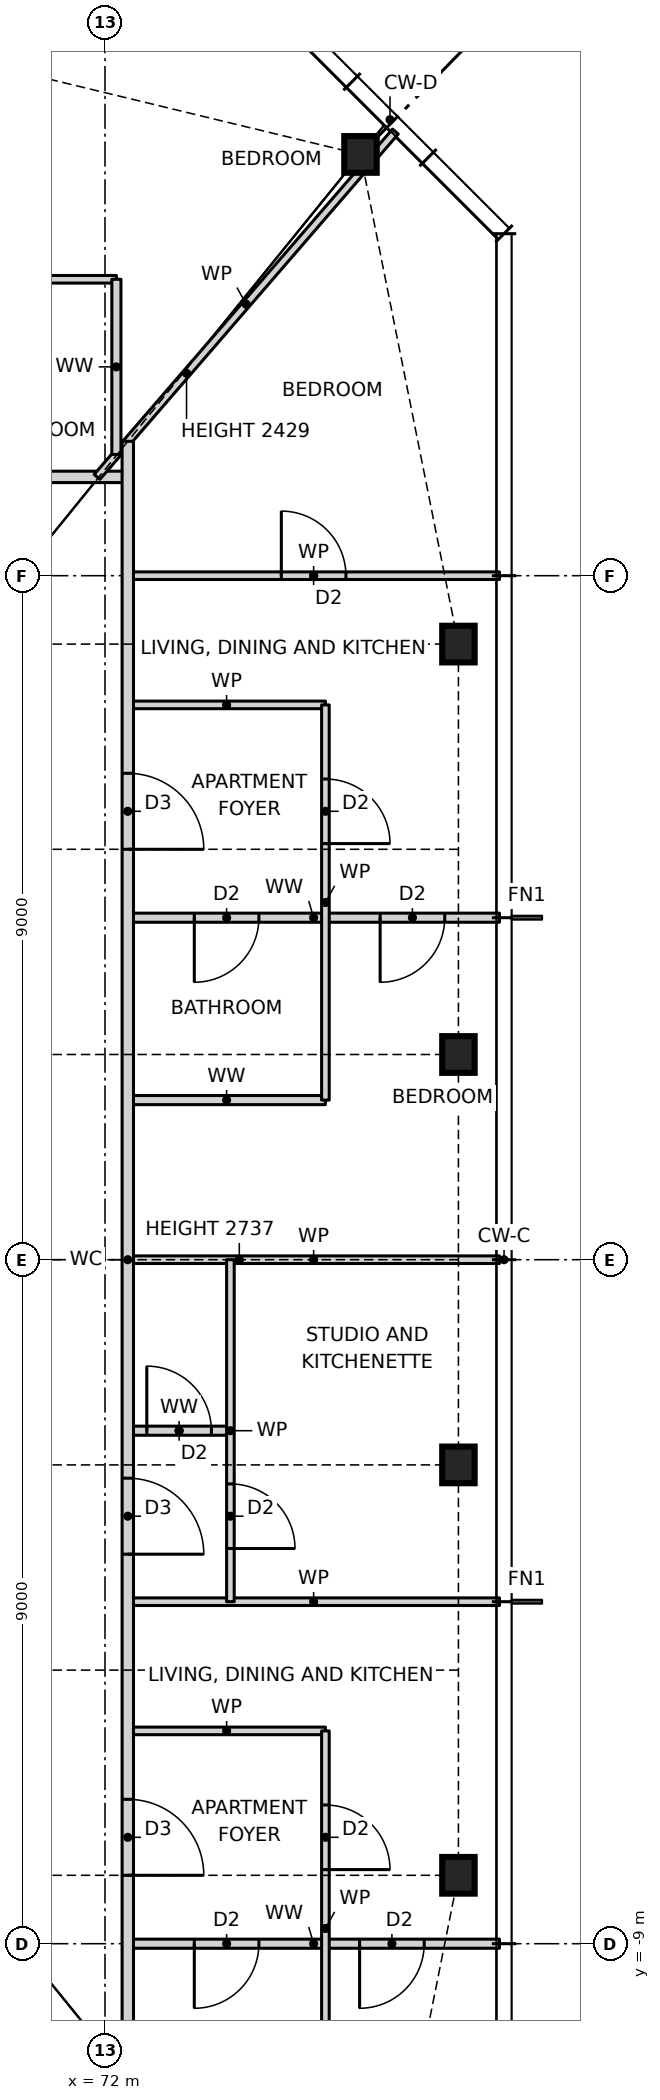
"""IFC4 building model, lengths in metres.
Left out: names, types, materials, properties, quantities, classifications, styles, units other than length and angle.
Written with IfcOpenShell. Run it as: python <this file> out.ifc"""

import sys

from ifc_helpers import new_model, si_unit, direction, frame, frame_2d, origin, origin_2d, place, context, subcontext, project, spatial, rectangle, i_section, extrude, element, fill, save


model = new_model("IFC4")
c1 = context("Model", 3, precision=1e-05, world=origin(), true_north=direction((0.0, 1.0)))
c2 = subcontext(c1, "Body", "Model", "MODEL_VIEW")
j1 = project(units=[si_unit("LENGTHUNIT", "METRE"), si_unit("PLANEANGLEUNIT", "RADIAN")], contexts=[c1])
p1 = place(None, origin())
s1 = spatial("IfcSite", under=j1, at=p1, CompositionType="ELEMENT")
p2 = place(p1, origin())
s2 = spatial("IfcBuilding", under=s1, at=p2, CompositionType="ELEMENT")
p3 = place(p2, frame((0.0, 0.0, 91.0)))
s3 = spatial("IfcBuildingStorey", under=s2, at=p3, CompositionType="ELEMENT", Elevation=91.0)
for number, where, z_axis, x_axis in (
    (1, (76.65, -8.1, 0.0), (0.0, 0.0, 1.0), (1.0, 0.0, 0.0)),
    (2, (76.65, -2.7, 0.0), (0.0, 0.0, 1.0), (1.0, 0.0, 0.0)),
    (3, (76.65, 2.7, 0.0), (0.0, 0.0, 1.0), (1.0, 0.0, 0.0)),
    (4, (76.65, 8.1, 0.0), (0.0, 0.0, 1.0), (1.0, 0.0, 0.0)),
    (5, (75.361, 14.543, 0.0), (0.0, 0.0, 1.0), (1.0, 0.0, 0.0)),
):
    element("IfcColumn", number, at=place(p3, frame(where, z_axis=z_axis, x_axis=x_axis)), inside=s3, PredefinedType="COLUMN", context=c2, shape_type="SweptSolid", body=[
        extrude(i_section(OverallWidth=0.427, OverallDepth=0.483, WebThickness=0.051, FlangeThickness=0.082, at=origin_2d()), origin(), (0.0, 0.0, 1.0), 3.5),
    ])
p4 = place(p3, frame((72.3, -9.0, 0.0), z_axis=(0.0, 0.0, 1.0), x_axis=(1.0, 0.0, 0.0)))
e6 = element("IfcWall", 6, at=p4, inside=s3, PredefinedType="PARTITIONING", context=c2, shape_type="SweptSolid", body=[
    extrude(rectangle(XDim=4.89, YDim=0.12, at=frame_2d((2.445, 0.0))), origin(), (0.0, 0.0, 1.0), 3.27),
])
p5 = place(p4, frame((0.875, 0.0, 0.0)))
e7 = element("IfcOpeningElement", 7, at=p5, cuts=e6, PredefinedType="OPENING", context=c2, shape_type="SweptSolid", body=[
    extrude(rectangle(XDim=0.85, YDim=2.1, at=frame_2d((0.425, 1.05))), frame((0.0, 0.07, 0.0), z_axis=(0.0, -1.0, 0.0), x_axis=(1.0, 0.0, 0.0)), (0.0, 0.0, 1.0), 0.14),
])
p6 = place(p4, frame((3.05, 0.0, 0.0)))
e8 = element("IfcOpeningElement", 8, at=p6, cuts=e6, PredefinedType="OPENING", context=c2, shape_type="SweptSolid", body=[
    extrude(rectangle(XDim=0.85, YDim=2.1, at=frame_2d((0.425, 1.05))), frame((0.0, 0.07, 0.0), z_axis=(0.0, -1.0, 0.0), x_axis=(1.0, 0.0, 0.0)), (0.0, 0.0, 1.0), 0.14),
])
p7 = place(p3, frame((72.3, -6.2, 0.0), z_axis=(0.0, 0.0, 1.0), x_axis=(1.0, 0.0, 0.0)))
e9 = element("IfcWall", 9, at=p7, inside=s3, PredefinedType="PARTITIONING", context=c2, shape_type="SweptSolid", body=[
    extrude(rectangle(XDim=2.6, YDim=0.1, at=frame_2d((1.3, 0.0))), origin(), (0.0, 0.0, 1.0), 3.27),
])
p8 = place(p3, frame((72.3, -4.5, 0.0), z_axis=(0.0, 0.0, 1.0), x_axis=(1.0, 0.0, 0.0)))
e10 = element("IfcWall", 10, at=p8, inside=s3, PredefinedType="PARTITIONING", context=c2, shape_type="SweptSolid", body=[
    extrude(rectangle(XDim=4.89, YDim=0.1, at=frame_2d((2.445, 0.0))), origin(), (0.0, 0.0, 1.0), 3.27),
])
p9 = place(p3, frame((72.3, -2.25, 0.0), z_axis=(0.0, 0.0, 1.0), x_axis=(1.0, 0.0, 0.0)))
e11 = element("IfcWall", 11, at=p9, inside=s3, PredefinedType="PARTITIONING", context=c2, shape_type="SweptSolid", body=[
    extrude(rectangle(XDim=1.35, YDim=0.12, at=frame_2d((0.675, 0.0))), origin(), (0.0, 0.0, 1.0), 3.27),
])
p10 = place(p9, frame((0.25, 0.0, 0.0)))
e12 = element("IfcOpeningElement", 12, at=p10, cuts=e11, PredefinedType="OPENING", context=c2, shape_type="SweptSolid", body=[
    extrude(rectangle(XDim=0.85, YDim=2.1, at=frame_2d((0.425, 1.05))), frame((0.0, 0.07, 0.0), z_axis=(0.0, -1.0, 0.0), x_axis=(1.0, 0.0, 0.0)), (0.0, 0.0, 1.0), 0.14),
])
p11 = place(p3, frame((72.3, 0.0, 0.0), z_axis=(0.0, 0.0, 1.0), x_axis=(1.0, 0.0, 0.0)))
e13 = element("IfcWall", 13, at=p11, inside=s3, PredefinedType="PARTITIONING", context=c2, shape_type="SweptSolid", body=[
    extrude(rectangle(XDim=4.89, YDim=0.1, at=frame_2d((2.445, 0.0))), origin(), (0.0, 0.0, 1.0), 2.737),
])
p12 = place(p3, frame((72.3, 2.1, 0.0), z_axis=(0.0, 0.0, 1.0), x_axis=(1.0, 0.0, 0.0)))
e14 = element("IfcWall", 14, at=p12, inside=s3, PredefinedType="PARTITIONING", context=c2, shape_type="SweptSolid", body=[
    extrude(rectangle(XDim=2.6, YDim=0.12, at=frame_2d((1.3, 0.0))), origin(), (0.0, 0.0, 1.0), 3.27),
])
p13 = place(p3, frame((72.3, 4.5, 0.0), z_axis=(0.0, 0.0, 1.0), x_axis=(1.0, 0.0, 0.0)))
e15 = element("IfcWall", 15, at=p13, inside=s3, PredefinedType="PARTITIONING", context=c2, shape_type="SweptSolid", body=[
    extrude(rectangle(XDim=4.89, YDim=0.12, at=frame_2d((2.445, 0.0))), origin(), (0.0, 0.0, 1.0), 3.27),
])
p14 = place(p13, frame((0.875, 0.0, 0.0)))
e16 = element("IfcOpeningElement", 16, at=p14, cuts=e15, PredefinedType="OPENING", context=c2, shape_type="SweptSolid", body=[
    extrude(rectangle(XDim=0.85, YDim=2.1, at=frame_2d((0.425, 1.05))), frame((0.0, 0.07, 0.0), z_axis=(0.0, -1.0, 0.0), x_axis=(1.0, 0.0, 0.0)), (0.0, 0.0, 1.0), 0.14),
])
p15 = place(p13, frame((3.32, 0.0, 0.0)))
e17 = element("IfcOpeningElement", 17, at=p15, cuts=e15, PredefinedType="OPENING", context=c2, shape_type="SweptSolid", body=[
    extrude(rectangle(XDim=0.85, YDim=2.1, at=frame_2d((0.425, 1.05))), frame((0.0, 0.07, 0.0), z_axis=(0.0, -1.0, 0.0), x_axis=(1.0, 0.0, 0.0)), (0.0, 0.0, 1.0), 0.14),
])
p16 = place(p3, frame((72.3, 7.3, 0.0), z_axis=(0.0, 0.0, 1.0), x_axis=(1.0, 0.0, 0.0)))
e18 = element("IfcWall", 18, at=p16, inside=s3, PredefinedType="PARTITIONING", context=c2, shape_type="SweptSolid", body=[
    extrude(rectangle(XDim=2.6, YDim=0.1, at=frame_2d((1.3, 0.0))), origin(), (0.0, 0.0, 1.0), 3.27),
])
p17 = place(p3, frame((72.3, 9.0, 0.0), z_axis=(0.0, 0.0, 1.0), x_axis=(1.0, 0.0, 0.0)))
e19 = element("IfcWall", 19, at=p17, inside=s3, PredefinedType="PARTITIONING", context=c2, shape_type="SweptSolid", body=[
    extrude(rectangle(XDim=4.89, YDim=0.1, at=frame_2d((2.445, 0.0))), origin(), (0.0, 0.0, 1.0), 3.27),
])
p18 = place(p17, frame((2.02, 0.0, 0.0)))
e20 = element("IfcOpeningElement", 20, at=p18, cuts=e19, PredefinedType="OPENING", context=c2, shape_type="SweptSolid", body=[
    extrude(rectangle(XDim=0.85, YDim=2.1, at=frame_2d((0.425, 1.05))), frame((0.0, 0.06, 0.0), z_axis=(0.0, -1.0, 0.0), x_axis=(1.0, 0.0, 0.0)), (0.0, 0.0, 1.0), 0.12),
])
p19 = place(p3, frame((53.7, 10.3, 0.0), z_axis=(0.0, 0.0, 1.0), x_axis=(1.0, 0.0, 0.0)))
e21 = element("IfcWall", 21, at=p19, inside=s3, PredefinedType="PARTITIONING", context=c2, shape_type="SweptSolid", body=[
    extrude(rectangle(XDim=18.6, YDim=0.15, at=frame_2d((9.3, 0.0))), origin(), (0.0, 0.0, 1.0), 3.27),
])
p20 = place(p19, frame((14.15, 0.0, 0.0)))
e22 = element("IfcOpeningElement", 22, at=p20, cuts=e21, PredefinedType="OPENING", context=c2, shape_type="SweptSolid", body=[
    extrude(rectangle(XDim=1.0, YDim=2.1, at=frame_2d((0.5, 1.05))), frame((0.0, 0.085, 0.0), z_axis=(0.0, -1.0, 0.0), x_axis=(1.0, 0.0, 0.0)), (0.0, 0.0, 1.0), 0.17),
])
p21 = place(p19, frame((9.925, 0.0, 0.0)))
e23 = element("IfcOpeningElement", 23, at=p21, cuts=e21, PredefinedType="OPENING", context=c2, shape_type="SweptSolid", body=[
    extrude(rectangle(XDim=1.0, YDim=2.1, at=frame_2d((0.5, 1.05))), frame((0.0, 0.085, 0.0), z_axis=(0.0, -1.0, 0.0), x_axis=(1.0, 0.0, 0.0)), (0.0, 0.0, 1.0), 0.17),
])
p22 = place(p19, frame((5.15, 0.0, 0.0)))
e24 = element("IfcOpeningElement", 24, at=p22, cuts=e21, PredefinedType="OPENING", context=c2, shape_type="SweptSolid", body=[
    extrude(rectangle(XDim=1.0, YDim=2.1, at=frame_2d((0.5, 1.05))), frame((0.0, 0.085, 0.0), z_axis=(0.0, -1.0, 0.0), x_axis=(1.0, 0.0, 0.0)), (0.0, 0.0, 1.0), 0.17),
])
p23 = place(p3, frame((66.95, 12.9, 0.0), z_axis=(0.0, 0.0, 1.0), x_axis=(1.0, 0.0, 0.0)))
e25 = element("IfcWall", 25, at=p23, inside=s3, PredefinedType="PARTITIONING", context=c2, shape_type="SweptSolid", body=[
    extrude(rectangle(XDim=5.2, YDim=0.1, at=frame_2d((2.6, 0.0))), origin(), (0.0, 0.0, 1.0), 3.27),
])
p24 = place(p23, frame((0.975, 0.0, 0.0)))
e26 = element("IfcOpeningElement", 26, at=p24, cuts=e25, PredefinedType="OPENING", context=c2, shape_type="SweptSolid", body=[
    extrude(rectangle(XDim=0.85, YDim=2.1, at=frame_2d((0.425, 1.05))), frame((0.0, 0.06, 0.0), z_axis=(0.0, -1.0, 0.0), x_axis=(1.0, 0.0, 0.0)), (0.0, 0.0, 1.0), 0.12),
])
p25 = place(p3, frame((71.895, 10.3, 0.0), z_axis=(0.0, 0.0, 1.0), x_axis=(0.65378286253, 0.756682211144, 0.0)))
e27 = element("IfcWall", 27, at=p25, inside=s3, PredefinedType="PARTITIONING", context=c2, shape_type="SweptSolid", body=[
    extrude(rectangle(XDim=6.005, YDim=0.1, at=frame_2d((3.002, 0.0))), origin(), (0.0, 0.0, 1.0), 2.429),
])
p26 = place(p3, frame((74.9, -11.4, 0.0), z_axis=(0.0, 0.0, 1.0), x_axis=(0.0, 1.0, 0.0)))
e28 = element("IfcWall", 28, at=p26, inside=s3, PredefinedType="PARTITIONING", context=c2, shape_type="SweptSolid", body=[
    extrude(rectangle(XDim=5.2, YDim=0.1, at=frame_2d((2.6, 0.0))), origin(), (0.0, 0.0, 1.0), 3.27),
])
p27 = place(p26, frame((3.375, 0.0, 0.0)))
e29 = element("IfcOpeningElement", 29, at=p27, cuts=e28, PredefinedType="OPENING", context=c2, shape_type="SweptSolid", body=[
    extrude(rectangle(XDim=0.85, YDim=2.1, at=frame_2d((0.425, 1.05))), frame((0.0, 0.06, 0.0), z_axis=(0.0, -1.0, 0.0), x_axis=(1.0, 0.0, 0.0)), (0.0, 0.0, 1.0), 0.12),
])
p28 = place(p3, frame((74.9, 2.1, 0.0), z_axis=(0.0, 0.0, 1.0), x_axis=(0.0, 1.0, 0.0)))
e30 = element("IfcWall", 30, at=p28, inside=s3, PredefinedType="PARTITIONING", context=c2, shape_type="SweptSolid", body=[
    extrude(rectangle(XDim=5.2, YDim=0.1, at=frame_2d((2.6, 0.0))), origin(), (0.0, 0.0, 1.0), 3.27),
])
p29 = place(p28, frame((3.375, 0.0, 0.0)))
e31 = element("IfcOpeningElement", 31, at=p29, cuts=e30, PredefinedType="OPENING", context=c2, shape_type="SweptSolid", body=[
    extrude(rectangle(XDim=0.85, YDim=2.1, at=frame_2d((0.425, 1.05))), frame((0.0, 0.06, 0.0), z_axis=(0.0, -1.0, 0.0), x_axis=(1.0, 0.0, 0.0)), (0.0, 0.0, 1.0), 0.12),
])
p30 = place(p3, frame((73.65, -4.5, 0.0), z_axis=(0.0, 0.0, 1.0), x_axis=(0.0, 1.0, 0.0)))
e32 = element("IfcWall", 32, at=p30, inside=s3, PredefinedType="PARTITIONING", context=c2, shape_type="SweptSolid", body=[
    extrude(rectangle(XDim=4.5, YDim=0.1, at=frame_2d((2.25, 0.0))), origin(), (0.0, 0.0, 1.0), 3.27),
])
p31 = place(p30, frame((0.7, 0.0, 0.0)))
e33 = element("IfcOpeningElement", 33, at=p31, cuts=e32, PredefinedType="OPENING", context=c2, shape_type="SweptSolid", body=[
    extrude(rectangle(XDim=0.85, YDim=2.1, at=frame_2d((0.425, 1.05))), frame((0.0, 0.06, 0.0), z_axis=(0.0, -1.0, 0.0), x_axis=(1.0, 0.0, 0.0)), (0.0, 0.0, 1.0), 0.12),
])
p32 = place(p3, frame((72.3, -10.768, 0.0), z_axis=(0.0, 0.0, 1.0), x_axis=(0.0, 1.0, 0.0)))
e34 = element("IfcWall", 34, at=p32, inside=s3, PredefinedType="PARTITIONING", context=c2, shape_type="SweptSolid", body=[
    extrude(rectangle(XDim=21.536, YDim=0.15, at=frame_2d((10.768, 0.0))), origin(), (0.0, 0.0, 1.0), 3.27),
])
p33 = place(p32, frame((2.668, 0.0, 0.0)))
e35 = element("IfcOpeningElement", 35, at=p33, cuts=e34, PredefinedType="OPENING", context=c2, shape_type="SweptSolid", body=[
    extrude(rectangle(XDim=1.0, YDim=2.1, at=frame_2d((0.5, 1.05))), frame((0.0, 0.085, 0.0), z_axis=(0.0, -1.0, 0.0), x_axis=(1.0, 0.0, 0.0)), (0.0, 0.0, 1.0), 0.17),
])
p34 = place(p32, frame((6.893, 0.0, 0.0)))
e36 = element("IfcOpeningElement", 36, at=p34, cuts=e34, PredefinedType="OPENING", context=c2, shape_type="SweptSolid", body=[
    extrude(rectangle(XDim=1.0, YDim=2.1, at=frame_2d((0.5, 1.05))), frame((0.0, 0.085, 0.0), z_axis=(0.0, -1.0, 0.0), x_axis=(1.0, 0.0, 0.0)), (0.0, 0.0, 1.0), 0.17),
])
p35 = place(p32, frame((16.168, 0.0, 0.0)))
e37 = element("IfcOpeningElement", 37, at=p35, cuts=e34, PredefinedType="OPENING", context=c2, shape_type="SweptSolid", body=[
    extrude(rectangle(XDim=1.0, YDim=2.1, at=frame_2d((0.5, 1.05))), frame((0.0, 0.085, 0.0), z_axis=(0.0, -1.0, 0.0), x_axis=(1.0, 0.0, 0.0)), (0.0, 0.0, 1.0), 0.17),
])
p36 = place(p3, frame((72.15, 10.595, 0.0), z_axis=(0.0, 0.0, 1.0), x_axis=(0.0, 1.0, 0.0)))
e38 = element("IfcWall", 38, at=p36, inside=s3, PredefinedType="PARTITIONING", context=c2, shape_type="SweptSolid", body=[
    extrude(rectangle(XDim=2.305, YDim=0.12, at=frame_2d((1.152, 0.0))), origin(), (0.0, 0.0, 1.0), 3.27),
])
p37 = place(p33, frame((1.0, 0.0, 0.0), z_axis=(0.0, 0.0, 1.0), x_axis=(-1.0, 0.0, 0.0)))
e39 = element("IfcDoor", 39, at=p37, inside=s3, OperationType="SINGLE_SWING_RIGHT", PredefinedType="DOOR", context=c2, shape_type="SweptSolid", body=[
    extrude(rectangle(XDim=1.0, YDim=2.1, at=frame_2d((0.5, 1.05))), frame((0.0, 0.025, 0.0), z_axis=(0.0, -1.0, 0.0), x_axis=(1.0, 0.0, 0.0)), (0.0, 0.0, 1.0), 0.05),
])
fill(e35, e39)
p38 = place(p27, frame((0.85, 0.0, 0.0), z_axis=(0.0, 0.0, 1.0), x_axis=(-1.0, 0.0, 0.0)))
e40 = element("IfcDoor", 40, at=p38, inside=s3, OperationType="SINGLE_SWING_RIGHT", PredefinedType="DOOR", context=c2, shape_type="SweptSolid", body=[
    extrude(rectangle(XDim=0.85, YDim=2.1, at=frame_2d((0.425, 1.05))), frame((0.0, 0.025, 0.0), z_axis=(0.0, -1.0, 0.0), x_axis=(1.0, 0.0, 0.0)), (0.0, 0.0, 1.0), 0.05),
])
fill(e29, e40)
p39 = place(p5, frame((0.85, 0.0, 0.0), z_axis=(0.0, 0.0, 1.0), x_axis=(-1.0, 0.0, 0.0)))
e41 = element("IfcDoor", 41, at=p39, inside=s3, OperationType="SINGLE_SWING_RIGHT", PredefinedType="DOOR", context=c2, shape_type="SweptSolid", body=[
    extrude(rectangle(XDim=0.85, YDim=2.1, at=frame_2d((0.425, 1.05))), frame((0.0, 0.025, 0.0), z_axis=(0.0, -1.0, 0.0), x_axis=(1.0, 0.0, 0.0)), (0.0, 0.0, 1.0), 0.05),
])
fill(e7, e41)
p40 = place(p6, frame((0.85, 0.0, 0.0), z_axis=(0.0, 0.0, 1.0), x_axis=(-1.0, 0.0, 0.0)))
e42 = element("IfcDoor", 42, at=p40, inside=s3, OperationType="SINGLE_SWING_RIGHT", PredefinedType="DOOR", context=c2, shape_type="SweptSolid", body=[
    extrude(rectangle(XDim=0.85, YDim=2.1, at=frame_2d((0.425, 1.05))), frame((0.0, 0.025, 0.0), z_axis=(0.0, -1.0, 0.0), x_axis=(1.0, 0.0, 0.0)), (0.0, 0.0, 1.0), 0.05),
])
fill(e8, e42)
p41 = place(p31, frame((0.85, 0.0, 0.0), z_axis=(0.0, 0.0, 1.0), x_axis=(-1.0, 0.0, 0.0)))
e43 = element("IfcDoor", 43, at=p41, inside=s3, OperationType="SINGLE_SWING_RIGHT", PredefinedType="DOOR", context=c2, shape_type="SweptSolid", body=[
    extrude(rectangle(XDim=0.85, YDim=2.1, at=frame_2d((0.425, 1.05))), frame((0.0, 0.025, 0.0), z_axis=(0.0, -1.0, 0.0), x_axis=(1.0, 0.0, 0.0)), (0.0, 0.0, 1.0), 0.05),
])
fill(e33, e43)
p42 = place(p34, frame((1.0, 0.0, 0.0), z_axis=(0.0, 0.0, 1.0), x_axis=(-1.0, 0.0, 0.0)))
e44 = element("IfcDoor", 44, at=p42, inside=s3, OperationType="SINGLE_SWING_RIGHT", PredefinedType="DOOR", context=c2, shape_type="SweptSolid", body=[
    extrude(rectangle(XDim=1.0, YDim=2.1, at=frame_2d((0.5, 1.05))), frame((0.0, 0.025, 0.0), z_axis=(0.0, -1.0, 0.0), x_axis=(1.0, 0.0, 0.0)), (0.0, 0.0, 1.0), 0.05),
])
fill(e36, e44)
p43 = place(p10, origin())
e45 = element("IfcDoor", 45, at=p43, inside=s3, OperationType="SINGLE_SWING_LEFT", PredefinedType="DOOR", context=c2, shape_type="SweptSolid", body=[
    extrude(rectangle(XDim=0.85, YDim=2.1, at=frame_2d((0.425, 1.05))), frame((0.0, 0.025, 0.0), z_axis=(0.0, -1.0, 0.0), x_axis=(1.0, 0.0, 0.0)), (0.0, 0.0, 1.0), 0.05),
])
fill(e12, e45)
p44 = place(p35, frame((1.0, 0.0, 0.0), z_axis=(0.0, 0.0, 1.0), x_axis=(-1.0, 0.0, 0.0)))
e46 = element("IfcDoor", 46, at=p44, inside=s3, OperationType="SINGLE_SWING_RIGHT", PredefinedType="DOOR", context=c2, shape_type="SweptSolid", body=[
    extrude(rectangle(XDim=1.0, YDim=2.1, at=frame_2d((0.5, 1.05))), frame((0.0, 0.025, 0.0), z_axis=(0.0, -1.0, 0.0), x_axis=(1.0, 0.0, 0.0)), (0.0, 0.0, 1.0), 0.05),
])
fill(e37, e46)
p45 = place(p29, frame((0.85, 0.0, 0.0), z_axis=(0.0, 0.0, 1.0), x_axis=(-1.0, 0.0, 0.0)))
e47 = element("IfcDoor", 47, at=p45, inside=s3, OperationType="SINGLE_SWING_RIGHT", PredefinedType="DOOR", context=c2, shape_type="SweptSolid", body=[
    extrude(rectangle(XDim=0.85, YDim=2.1, at=frame_2d((0.425, 1.05))), frame((0.0, 0.025, 0.0), z_axis=(0.0, -1.0, 0.0), x_axis=(1.0, 0.0, 0.0)), (0.0, 0.0, 1.0), 0.05),
])
fill(e31, e47)
p46 = place(p14, frame((0.85, 0.0, 0.0), z_axis=(0.0, 0.0, 1.0), x_axis=(-1.0, 0.0, 0.0)))
e48 = element("IfcDoor", 48, at=p46, inside=s3, OperationType="SINGLE_SWING_RIGHT", PredefinedType="DOOR", context=c2, shape_type="SweptSolid", body=[
    extrude(rectangle(XDim=0.85, YDim=2.1, at=frame_2d((0.425, 1.05))), frame((0.0, 0.025, 0.0), z_axis=(0.0, -1.0, 0.0), x_axis=(1.0, 0.0, 0.0)), (0.0, 0.0, 1.0), 0.05),
])
fill(e16, e48)
p47 = place(p15, frame((0.85, 0.0, 0.0), z_axis=(0.0, 0.0, 1.0), x_axis=(-1.0, 0.0, 0.0)))
e49 = element("IfcDoor", 49, at=p47, inside=s3, OperationType="SINGLE_SWING_RIGHT", PredefinedType="DOOR", context=c2, shape_type="SweptSolid", body=[
    extrude(rectangle(XDim=0.85, YDim=2.1, at=frame_2d((0.425, 1.05))), frame((0.0, 0.025, 0.0), z_axis=(0.0, -1.0, 0.0), x_axis=(1.0, 0.0, 0.0)), (0.0, 0.0, 1.0), 0.05),
])
fill(e17, e49)
p48 = place(p18, origin())
e50 = element("IfcDoor", 50, at=p48, inside=s3, OperationType="SINGLE_SWING_LEFT", PredefinedType="DOOR", context=c2, shape_type="SweptSolid", body=[
    extrude(rectangle(XDim=0.85, YDim=2.1, at=frame_2d((0.425, 1.05))), frame((0.0, 0.025, 0.0), z_axis=(0.0, -1.0, 0.0), x_axis=(1.0, 0.0, 0.0)), (0.0, 0.0, 1.0), 0.05),
])
fill(e20, e50)
save(model, sys.argv[1])
